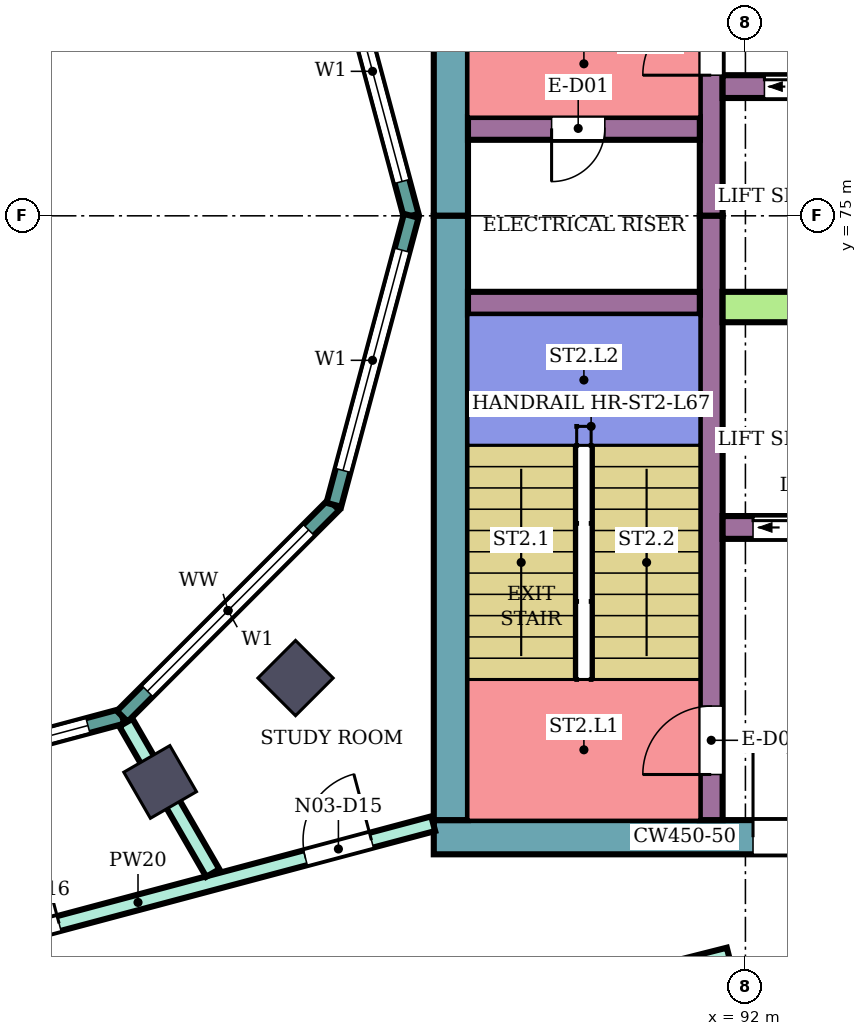
"""IFC4 building model, lengths in metres.
Left out: names, types, materials, properties, quantities, classifications, styles, units other than length and angle.
Written with IfcOpenShell. Run it as: python <this file> out.ifc"""

import sys

from ifc_helpers import new_model, si_unit, direction, frame, frame_2d, origin, origin_2d, place, context, subcontext, project, spatial, rectangle, extrude, element, fill, save


model = new_model("IFC4")
c1 = context("Model", 3, precision=1e-05, world=origin(), true_north=direction((0.0, 1.0)))
c2 = subcontext(c1, "Body", "Model", "MODEL_VIEW")
j1 = project(units=[si_unit("LENGTHUNIT", "METRE"), si_unit("PLANEANGLEUNIT", "RADIAN")], contexts=[c1])
p1 = place(None, origin())
s1 = spatial("IfcSite", under=j1, at=p1, CompositionType="ELEMENT")
p2 = place(p1, origin())
s2 = spatial("IfcBuilding", under=s1, at=p2, CompositionType="ELEMENT")
p3 = place(p2, frame((0.0, 0.0, 292.5)))
s3 = spatial("IfcBuildingStorey", under=s2, at=p3, CompositionType="ELEMENT", Elevation=292.5)
for number, where, z_axis, x_axis in (
    (1, (84.3, 67.552, 0.0), (0.0, 0.0, 1.0), (0.5, -0.866, 0.0)),
    (2, (86.081, 68.919, 0.0), (0.0, 0.0, 1.0), (0.707, -0.707, 0.0)),
):
    element("IfcColumn", number, at=place(p3, frame(where, z_axis=z_axis, x_axis=x_axis)), inside=s3, PredefinedType="COLUMN", context=c2, shape_type="SweptSolid", body=[
        extrude(rectangle(XDim=0.7, YDim=0.7, at=origin_2d()), origin(), (0.0, 0.0, 1.0), 4.2),
    ])
p4 = place(p3, frame((87.9, 66.825, 0.0), z_axis=(0.0, 0.0, 1.0), x_axis=(1.0, 0.0, 0.0)))
e3 = element("IfcWall", 3, at=p4, inside=s3, PredefinedType="SHEAR", context=c2, shape_type="SweptSolid", body=[
    extrude(rectangle(XDim=12.0, YDim=0.45, at=frame_2d((6.0, 0.0))), origin(), (0.0, 0.0, 1.0), 3.88),
])
p5 = place(p4, frame((4.2, 0.0, 0.0)))
e4 = element("IfcOpeningElement", 4, at=p5, cuts=e3, PredefinedType="OPENING", context=c2, shape_type="SweptSolid", body=[
    extrude(rectangle(XDim=2.4, YDim=2.4, at=frame_2d((1.2, 1.2))), frame((0.0, 0.235, 0.0), z_axis=(0.0, -1.0, 0.0), x_axis=(1.0, 0.0, 0.0)), (0.0, 0.0, 1.0), 0.47),
])
for number, where, z_axis, x_axis in (
    (5, (88.125, 75.0, 0.0), (0.0, 0.0, 1.0), (0.0, 1.0, 0.0)),
    (6, (88.125, 67.05, 0.0), (0.0, 0.0, 1.0), (0.0, 1.0, 0.0)),
):
    element("IfcWall", number, at=place(p3, frame(where, z_axis=z_axis, x_axis=x_axis)), inside=s3, PredefinedType="SHEAR", context=c2, shape_type="SweptSolid", body=[
        extrude(rectangle(XDim=7.95, YDim=0.45, at=frame_2d((3.975, 0.0))), origin(), (0.0, 0.0, 1.0), 3.88),
    ])
p6 = place(p3, frame((91.55, 75.0, 0.0), z_axis=(0.0, 0.0, 1.0), x_axis=(0.0, 1.0, 0.0)))
e7 = element("IfcWall", 7, at=p6, inside=s3, PredefinedType="SHEAR", context=c2, shape_type="SweptSolid", body=[
    extrude(rectangle(XDim=7.95, YDim=0.3, at=frame_2d((3.975, 0.0))), origin(), (0.0, 0.0, 1.0), 3.88),
])
p7 = place(p6, frame((1.85, 0.0, 0.0)))
e8 = element("IfcOpeningElement", 8, at=p7, cuts=e7, PredefinedType="OPENING", context=c2, shape_type="SweptSolid", body=[
    extrude(rectangle(XDim=0.9, YDim=2.1, at=frame_2d((0.45, 1.05))), frame((0.0, 0.16, 0.0), z_axis=(0.0, -1.0, 0.0), x_axis=(1.0, 0.0, 0.0)), (0.0, 0.0, 1.0), 0.32),
])
p8 = place(p3, frame((91.55, 67.05, 0.0), z_axis=(0.0, 0.0, 1.0), x_axis=(0.0, 1.0, 0.0)))
e9 = element("IfcWall", 9, at=p8, inside=s3, PredefinedType="SHEAR", context=c2, shape_type="SweptSolid", body=[
    extrude(rectangle(XDim=7.95, YDim=0.3, at=frame_2d((3.975, 0.0))), origin(), (0.0, 0.0, 1.0), 3.88),
])
p9 = place(p8, frame((0.6, 0.0, 0.0)))
e10 = element("IfcOpeningElement", 10, at=p9, cuts=e9, PredefinedType="OPENING", context=c2, shape_type="SweptSolid", body=[
    extrude(rectangle(XDim=0.9, YDim=2.1, at=frame_2d((0.45, 1.05))), frame((0.0, 0.16, 0.0), z_axis=(0.0, -1.0, 0.0), x_axis=(1.0, 0.0, 0.0)), (0.0, 0.0, 1.0), 0.32),
])
p10 = place(p3, frame((88.35, 76.15, 0.0), z_axis=(0.0, 0.0, 1.0), x_axis=(1.0, 0.0, 0.0)))
e11 = element("IfcWall", 11, at=p10, inside=s3, PredefinedType="SHEAR", context=c2, shape_type="SweptSolid", body=[
    extrude(rectangle(XDim=3.05, YDim=0.3, at=frame_2d((1.525, 0.0))), origin(), (0.0, 0.0, 1.0), 3.88),
])
p11 = place(p10, frame((1.1, 0.0, 0.0)))
e12 = element("IfcOpeningElement", 12, at=p11, cuts=e11, PredefinedType="OPENING", context=c2, shape_type="SweptSolid", body=[
    extrude(rectangle(XDim=0.7, YDim=2.0, at=frame_2d((0.35, 1.0))), frame((0.0, 0.16, 0.0), z_axis=(0.0, -1.0, 0.0), x_axis=(1.0, 0.0, 0.0)), (0.0, 0.0, 1.0), 0.32),
])
p12 = place(p3, frame((88.35, 73.85, 0.0), z_axis=(0.0, 0.0, 1.0), x_axis=(1.0, 0.0, 0.0)))
e13 = element("IfcWall", 13, at=p12, inside=s3, PredefinedType="SHEAR", context=c2, shape_type="SweptSolid", body=[
    extrude(rectangle(XDim=3.05, YDim=0.3, at=frame_2d((1.525, 0.0))), origin(), (0.0, 0.0, 1.0), 3.88),
])
p13 = place(p3, frame((91.7, 76.7, 0.0), z_axis=(0.0, 0.0, 1.0), x_axis=(1.0, 0.0, 0.0)))
e14 = element("IfcWall", 14, at=p13, inside=s3, PredefinedType="SHEAR", context=c2, shape_type="SweptSolid", body=[
    extrude(rectangle(XDim=7.75, YDim=0.3, at=frame_2d((3.875, 0.0))), origin(), (0.0, 0.0, 1.0), 3.88),
])
p14 = place(p13, frame((0.55, 0.0, 0.0)))
e15 = element("IfcOpeningElement", 15, at=p14, cuts=e14, PredefinedType="OPENING", context=c2, shape_type="SweptSolid", body=[
    extrude(rectangle(XDim=1.1, YDim=2.1, at=frame_2d((0.55, 1.05))), frame((0.0, 0.16, 0.0), z_axis=(0.0, -1.0, 0.0), x_axis=(1.0, 0.0, 0.0)), (0.0, 0.0, 1.0), 0.32),
])
p15 = place(p13, frame((3.0, 0.0, 0.0)))
e16 = element("IfcOpeningElement", 16, at=p15, cuts=e14, PredefinedType="OPENING", context=c2, shape_type="SweptSolid", body=[
    extrude(rectangle(XDim=1.2, YDim=2.1, at=frame_2d((0.6, 1.05))), frame((0.0, 0.16, 0.0), z_axis=(0.0, -1.0, 0.0), x_axis=(1.0, 0.0, 0.0)), (0.0, 0.0, 1.0), 0.32),
])
p16 = place(p13, frame((5.5, 0.0, 0.0)))
e17 = element("IfcOpeningElement", 17, at=p16, cuts=e14, PredefinedType="OPENING", context=c2, shape_type="SweptSolid", body=[
    extrude(rectangle(XDim=1.2, YDim=2.1, at=frame_2d((0.6, 1.05))), frame((0.0, 0.16, 0.0), z_axis=(0.0, -1.0, 0.0), x_axis=(1.0, 0.0, 0.0)), (0.0, 0.0, 1.0), 0.32),
])
p17 = place(p3, frame((91.7, 73.8, 0.0), z_axis=(0.0, 0.0, 1.0), x_axis=(1.0, 0.0, 0.0)))
e18 = element("IfcWall", 18, at=p17, inside=s3, PredefinedType="SHEAR", context=c2, shape_type="SweptSolid", body=[
    extrude(rectangle(XDim=7.75, YDim=0.4, at=frame_2d((3.875, 0.0))), origin(), (0.0, 0.0, 1.0), 3.88),
])
p18 = place(p3, frame((91.7, 70.9, 0.0), z_axis=(0.0, 0.0, 1.0), x_axis=(1.0, 0.0, 0.0)))
e19 = element("IfcWall", 19, at=p18, inside=s3, PredefinedType="SHEAR", context=c2, shape_type="SweptSolid", body=[
    extrude(rectangle(XDim=9.3, YDim=0.3, at=frame_2d((4.65, 0.0))), origin(), (0.0, 0.0, 1.0), 3.88),
])
p19 = place(p18, frame((0.4, 0.0, 0.0)))
e20 = element("IfcOpeningElement", 20, at=p19, cuts=e19, PredefinedType="OPENING", context=c2, shape_type="SweptSolid", body=[
    extrude(rectangle(XDim=1.4, YDim=2.1, at=frame_2d((0.7, 1.05))), frame((0.0, 0.16, 0.0), z_axis=(0.0, -1.0, 0.0), x_axis=(1.0, 0.0, 0.0)), (0.0, 0.0, 1.0), 0.32),
])
p20 = place(p18, frame((3.0, 0.0, 0.0)))
e21 = element("IfcOpeningElement", 21, at=p20, cuts=e19, PredefinedType="OPENING", context=c2, shape_type="SweptSolid", body=[
    extrude(rectangle(XDim=1.2, YDim=2.1, at=frame_2d((0.6, 1.05))), frame((0.0, 0.16, 0.0), z_axis=(0.0, -1.0, 0.0), x_axis=(1.0, 0.0, 0.0)), (0.0, 0.0, 1.0), 0.32),
])
p21 = place(p18, frame((5.925, 0.0, 0.0)))
e22 = element("IfcOpeningElement", 22, at=p21, cuts=e19, PredefinedType="OPENING", context=c2, shape_type="SweptSolid", body=[
    extrude(rectangle(XDim=0.9, YDim=2.1, at=frame_2d((0.45, 1.05))), frame((0.0, 0.16, 0.0), z_axis=(0.0, -1.0, 0.0), x_axis=(1.0, 0.0, 0.0)), (0.0, 0.0, 1.0), 0.32),
])
p22 = place(p3, frame((87.604, 75.0, 0.0), z_axis=(0.0, 0.0, 1.0), x_axis=(-0.258789828301, 0.965933654434, 0.0)))
e23 = element("IfcWall", 23, at=p22, inside=s3, PredefinedType="NOTDEFINED", context=c2, shape_type="SweptSolid", body=[
    extrude(rectangle(XDim=3.936, YDim=0.2, at=frame_2d((1.968, 0.0))), origin(), (0.0, 0.0, 1.0), 4.2),
])
p23 = place(p22, frame((0.468, 0.0, 0.9)))
e24 = element("IfcOpeningElement", 24, at=p23, cuts=e23, PredefinedType="OPENING", context=c2, shape_type="SweptSolid", body=[
    extrude(rectangle(XDim=3.0, YDim=2.3, at=frame_2d((1.5, 1.15))), frame((0.0, 0.11, 0.0), z_axis=(0.0, -1.0, 0.0), x_axis=(1.0, 0.0, 0.0)), (0.0, 0.0, 1.0), 0.22),
])
p24 = place(p3, frame((80.0, 67.396, 0.0), z_axis=(0.0, 0.0, 1.0), x_axis=(0.965933654434, 0.258789828301, 0.0)))
e25 = element("IfcWall", 25, at=p24, inside=s3, PredefinedType="NOTDEFINED", context=c2, shape_type="SweptSolid", body=[
    extrude(rectangle(XDim=3.936, YDim=0.2, at=frame_2d((1.968, 0.0))), origin(), (0.0, 0.0, 1.0), 4.2),
])
p25 = place(p24, frame((0.468, 0.0, 0.9)))
e26 = element("IfcOpeningElement", 26, at=p25, cuts=e25, PredefinedType="OPENING", context=c2, shape_type="SweptSolid", body=[
    extrude(rectangle(XDim=3.0, YDim=2.3, at=frame_2d((1.5, 1.15))), frame((0.0, 0.11, 0.0), z_axis=(0.0, -1.0, 0.0), x_axis=(1.0, 0.0, 0.0)), (0.0, 0.0, 1.0), 0.22),
])
p26 = place(p3, frame((83.802, 68.415, 0.0), z_axis=(0.0, 0.0, 1.0), x_axis=(0.707106781187, 0.707106781187, 0.0)))
e27 = element("IfcWall", 27, at=p26, inside=s3, PredefinedType="NOTDEFINED", context=c2, shape_type="SweptSolid", body=[
    extrude(rectangle(XDim=3.936, YDim=0.2, at=frame_2d((1.968, 0.0))), origin(), (0.0, 0.0, 1.0), 4.2),
])
p27 = place(p26, frame((0.468, 0.0, 0.9)))
e28 = element("IfcOpeningElement", 28, at=p27, cuts=e27, PredefinedType="OPENING", context=c2, shape_type="SweptSolid", body=[
    extrude(rectangle(XDim=3.0, YDim=2.3, at=frame_2d((1.5, 1.15))), frame((0.0, 0.11, 0.0), z_axis=(0.0, -1.0, 0.0), x_axis=(1.0, 0.0, 0.0)), (0.0, 0.0, 1.0), 0.22),
])
p28 = place(p3, frame((86.585, 71.198, 0.0), z_axis=(0.0, 0.0, 1.0), x_axis=(0.258789828301, 0.965933654434, 0.0)))
e29 = element("IfcWall", 29, at=p28, inside=s3, PredefinedType="NOTDEFINED", context=c2, shape_type="SweptSolid", body=[
    extrude(rectangle(XDim=3.936, YDim=0.2, at=frame_2d((1.968, 0.0))), origin(), (0.0, 0.0, 1.0), 4.2),
])
p29 = place(p28, frame((0.468, 0.0, 0.9)))
e30 = element("IfcOpeningElement", 30, at=p29, cuts=e29, PredefinedType="OPENING", context=c2, shape_type="SweptSolid", body=[
    extrude(rectangle(XDim=3.0, YDim=2.3, at=frame_2d((1.5, 1.15))), frame((0.0, 0.11, 0.0), z_axis=(0.0, -1.0, 0.0), x_axis=(1.0, 0.0, 0.0)), (0.0, 0.0, 1.0), 0.22),
])
p30 = place(p3, frame((80.125, 64.932, 0.0), z_axis=(0.0, 0.0, 1.0), x_axis=(0.966236955806, 0.257655089674, 0.0)))
e31 = element("IfcWall", 31, at=p30, inside=s3, PredefinedType="PARTITIONING", context=c2, shape_type="SweptSolid", body=[
    extrude(rectangle(XDim=8.039, YDim=0.2, at=frame_2d((4.02, 0.0))), origin(), (0.0, 0.0, 1.0), 3.75),
])
p31 = place(p30, frame((6.298, 0.0, 0.0)))
e32 = element("IfcOpeningElement", 32, at=p31, cuts=e31, PredefinedType="OPENING", context=c2, shape_type="SweptSolid", body=[
    extrude(rectangle(XDim=0.9, YDim=2.1, at=frame_2d((0.45, 1.05))), frame((0.0, 0.11, 0.0), z_axis=(0.0, -1.0, 0.0), x_axis=(1.0, 0.0, 0.0)), (0.0, 0.0, 1.0), 0.22),
])
p32 = place(p30, frame((2.045, 0.0, 0.0)))
e33 = element("IfcOpeningElement", 33, at=p32, cuts=e31, PredefinedType="OPENING", context=c2, shape_type="SweptSolid", body=[
    extrude(rectangle(XDim=0.9, YDim=2.1, at=frame_2d((0.45, 1.05))), frame((0.0, 0.11, 0.0), z_axis=(0.0, -1.0, 0.0), x_axis=(1.0, 0.0, 0.0)), (0.0, 0.0, 1.0), 0.22),
])
p33 = place(p3, frame((83.85, 68.333, 0.0), z_axis=(0.0, 0.0, 1.0), x_axis=(0.500080019051, -0.865979199835, 0.0)))
e34 = element("IfcWall", 34, at=p33, inside=s3, PredefinedType="PARTITIONING", context=c2, shape_type="SweptSolid", body=[
    extrude(rectangle(XDim=2.285, YDim=0.2, at=frame_2d((1.143, 0.0))), origin(), (0.0, 0.0, 1.0), 3.75),
])
p34 = place(p3, frame((86.053, 63.826, 0.0), z_axis=(0.0, 0.0, 1.0), x_axis=(0.969480070232, 0.245170131586, 0.0)))
e35 = element("IfcWall", 35, at=p34, inside=s3, PredefinedType="PARTITIONING", context=c2, shape_type="SweptSolid", body=[
    extrude(rectangle(XDim=5.907, YDim=0.2, at=frame_2d((2.954, 0.0))), origin(), (0.0, 0.0, 1.0), 3.75),
])
p35 = place(p34, frame((2.464, 0.0, 0.0)))
e36 = element("IfcOpeningElement", 36, at=p35, cuts=e35, PredefinedType="OPENING", context=c2, shape_type="SweptSolid", body=[
    extrude(rectangle(XDim=1.0, YDim=2.1, at=frame_2d((0.5, 1.05))), frame((0.0, 0.11, 0.0), z_axis=(0.0, -1.0, 0.0), x_axis=(1.0, 0.0, 0.0)), (0.0, 0.0, 1.0), 0.22),
])
p36 = place(p23, origin())
e37 = element("IfcWindow", 37, at=p36, inside=s3, PartitioningType="SINGLE_PANEL", PredefinedType="WINDOW", context=c2, shape_type="SweptSolid", body=[
    extrude(rectangle(XDim=3.0, YDim=2.3, at=frame_2d((1.5, 1.15))), frame((0.0, 0.03, 0.0), z_axis=(0.0, -1.0, 0.0), x_axis=(1.0, 0.0, 0.0)), (0.0, 0.0, 1.0), 0.06),
])
fill(e24, e37)
p37 = place(p25, origin())
e38 = element("IfcWindow", 38, at=p37, inside=s3, PartitioningType="SINGLE_PANEL", PredefinedType="WINDOW", context=c2, shape_type="SweptSolid", body=[
    extrude(rectangle(XDim=3.0, YDim=2.3, at=frame_2d((1.5, 1.15))), frame((0.0, 0.03, 0.0), z_axis=(0.0, -1.0, 0.0), x_axis=(1.0, 0.0, 0.0)), (0.0, 0.0, 1.0), 0.06),
])
fill(e26, e38)
p38 = place(p27, origin())
e39 = element("IfcWindow", 39, at=p38, inside=s3, PartitioningType="SINGLE_PANEL", PredefinedType="WINDOW", context=c2, shape_type="SweptSolid", body=[
    extrude(rectangle(XDim=3.0, YDim=2.3, at=frame_2d((1.5, 1.15))), frame((0.0, 0.03, 0.0), z_axis=(0.0, -1.0, 0.0), x_axis=(1.0, 0.0, 0.0)), (0.0, 0.0, 1.0), 0.06),
])
fill(e28, e39)
p39 = place(p29, origin())
e40 = element("IfcWindow", 40, at=p39, inside=s3, PartitioningType="SINGLE_PANEL", PredefinedType="WINDOW", context=c2, shape_type="SweptSolid", body=[
    extrude(rectangle(XDim=3.0, YDim=2.3, at=frame_2d((1.5, 1.15))), frame((0.0, 0.03, 0.0), z_axis=(0.0, -1.0, 0.0), x_axis=(1.0, 0.0, 0.0)), (0.0, 0.0, 1.0), 0.06),
])
fill(e30, e40)
p40 = place(p31, origin())
e41 = element("IfcDoor", 41, at=p40, inside=s3, OperationType="SINGLE_SWING_RIGHT", PredefinedType="DOOR", context=c2, shape_type="SweptSolid", body=[
    extrude(rectangle(XDim=0.9, YDim=2.1, at=frame_2d((0.45, 1.05))), frame((0.0, 0.025, 0.0), z_axis=(0.0, -1.0, 0.0), x_axis=(1.0, 0.0, 0.0)), (0.0, 0.0, 1.0), 0.05),
])
fill(e32, e41)
p41 = place(p32, origin())
e42 = element("IfcDoor", 42, at=p41, inside=s3, OperationType="SINGLE_SWING_RIGHT", PredefinedType="DOOR", context=c2, shape_type="SweptSolid", body=[
    extrude(rectangle(XDim=0.9, YDim=2.1, at=frame_2d((0.45, 1.05))), frame((0.0, 0.025, 0.0), z_axis=(0.0, -1.0, 0.0), x_axis=(1.0, 0.0, 0.0)), (0.0, 0.0, 1.0), 0.05),
])
fill(e33, e42)
p42 = place(p11, frame((0.7, 0.0, 0.0), z_axis=(0.0, 0.0, 1.0), x_axis=(-1.0, 0.0, 0.0)))
e43 = element("IfcDoor", 43, at=p42, inside=s3, OperationType="SINGLE_SWING_RIGHT", PredefinedType="DOOR", context=c2, shape_type="SweptSolid", body=[
    extrude(rectangle(XDim=0.7, YDim=2.0, at=frame_2d((0.35, 1.0))), frame((0.0, 0.025, 0.0), z_axis=(0.0, -1.0, 0.0), x_axis=(1.0, 0.0, 0.0)), (0.0, 0.0, 1.0), 0.05),
])
fill(e12, e43)
p43 = place(p7, origin())
e44 = element("IfcDoor", 44, at=p43, inside=s3, OperationType="SINGLE_SWING_LEFT", PredefinedType="DOOR", context=c2, shape_type="SweptSolid", body=[
    extrude(rectangle(XDim=0.9, YDim=2.1, at=frame_2d((0.45, 1.05))), frame((0.0, 0.025, 0.0), z_axis=(0.0, -1.0, 0.0), x_axis=(1.0, 0.0, 0.0)), (0.0, 0.0, 1.0), 0.05),
])
fill(e8, e44)
p44 = place(p9, origin())
e45 = element("IfcDoor", 45, at=p44, inside=s3, OperationType="SINGLE_SWING_LEFT", PredefinedType="DOOR", context=c2, shape_type="SweptSolid", body=[
    extrude(rectangle(XDim=0.9, YDim=2.1, at=frame_2d((0.45, 1.05))), frame((0.0, 0.025, 0.0), z_axis=(0.0, -1.0, 0.0), x_axis=(1.0, 0.0, 0.0)), (0.0, 0.0, 1.0), 0.05),
])
fill(e10, e45)
p45 = place(p14, origin())
e46 = element("IfcDoor", 46, at=p45, inside=s3, OperationType="DOUBLE_DOOR_SLIDING", PredefinedType="DOOR", context=c2, shape_type="SweptSolid", body=[
    extrude(rectangle(XDim=1.1, YDim=2.1, at=frame_2d((0.55, 1.05))), frame((0.0, 0.025, 0.0), z_axis=(0.0, -1.0, 0.0), x_axis=(1.0, 0.0, 0.0)), (0.0, 0.0, 1.0), 0.05),
])
fill(e15, e46)
p46 = place(p19, origin())
e47 = element("IfcDoor", 47, at=p46, inside=s3, OperationType="DOUBLE_DOOR_SLIDING", PredefinedType="DOOR", context=c2, shape_type="SweptSolid", body=[
    extrude(rectangle(XDim=1.4, YDim=2.1, at=frame_2d((0.7, 1.05))), frame((0.0, 0.025, 0.0), z_axis=(0.0, -1.0, 0.0), x_axis=(1.0, 0.0, 0.0)), (0.0, 0.0, 1.0), 0.05),
])
fill(e20, e47)
p47 = place(p5, origin())
e48 = element("IfcDoor", 48, at=p47, inside=s3, OperationType="DOUBLE_DOOR_SINGLE_SWING", PredefinedType="DOOR", context=c2, shape_type="SweptSolid", body=[
    extrude(rectangle(XDim=2.4, YDim=2.4, at=frame_2d((1.2, 1.2))), frame((0.0, 0.025, 0.0), z_axis=(0.0, -1.0, 0.0), x_axis=(1.0, 0.0, 0.0)), (0.0, 0.0, 1.0), 0.05),
])
fill(e4, e48)
save(model, sys.argv[1])
